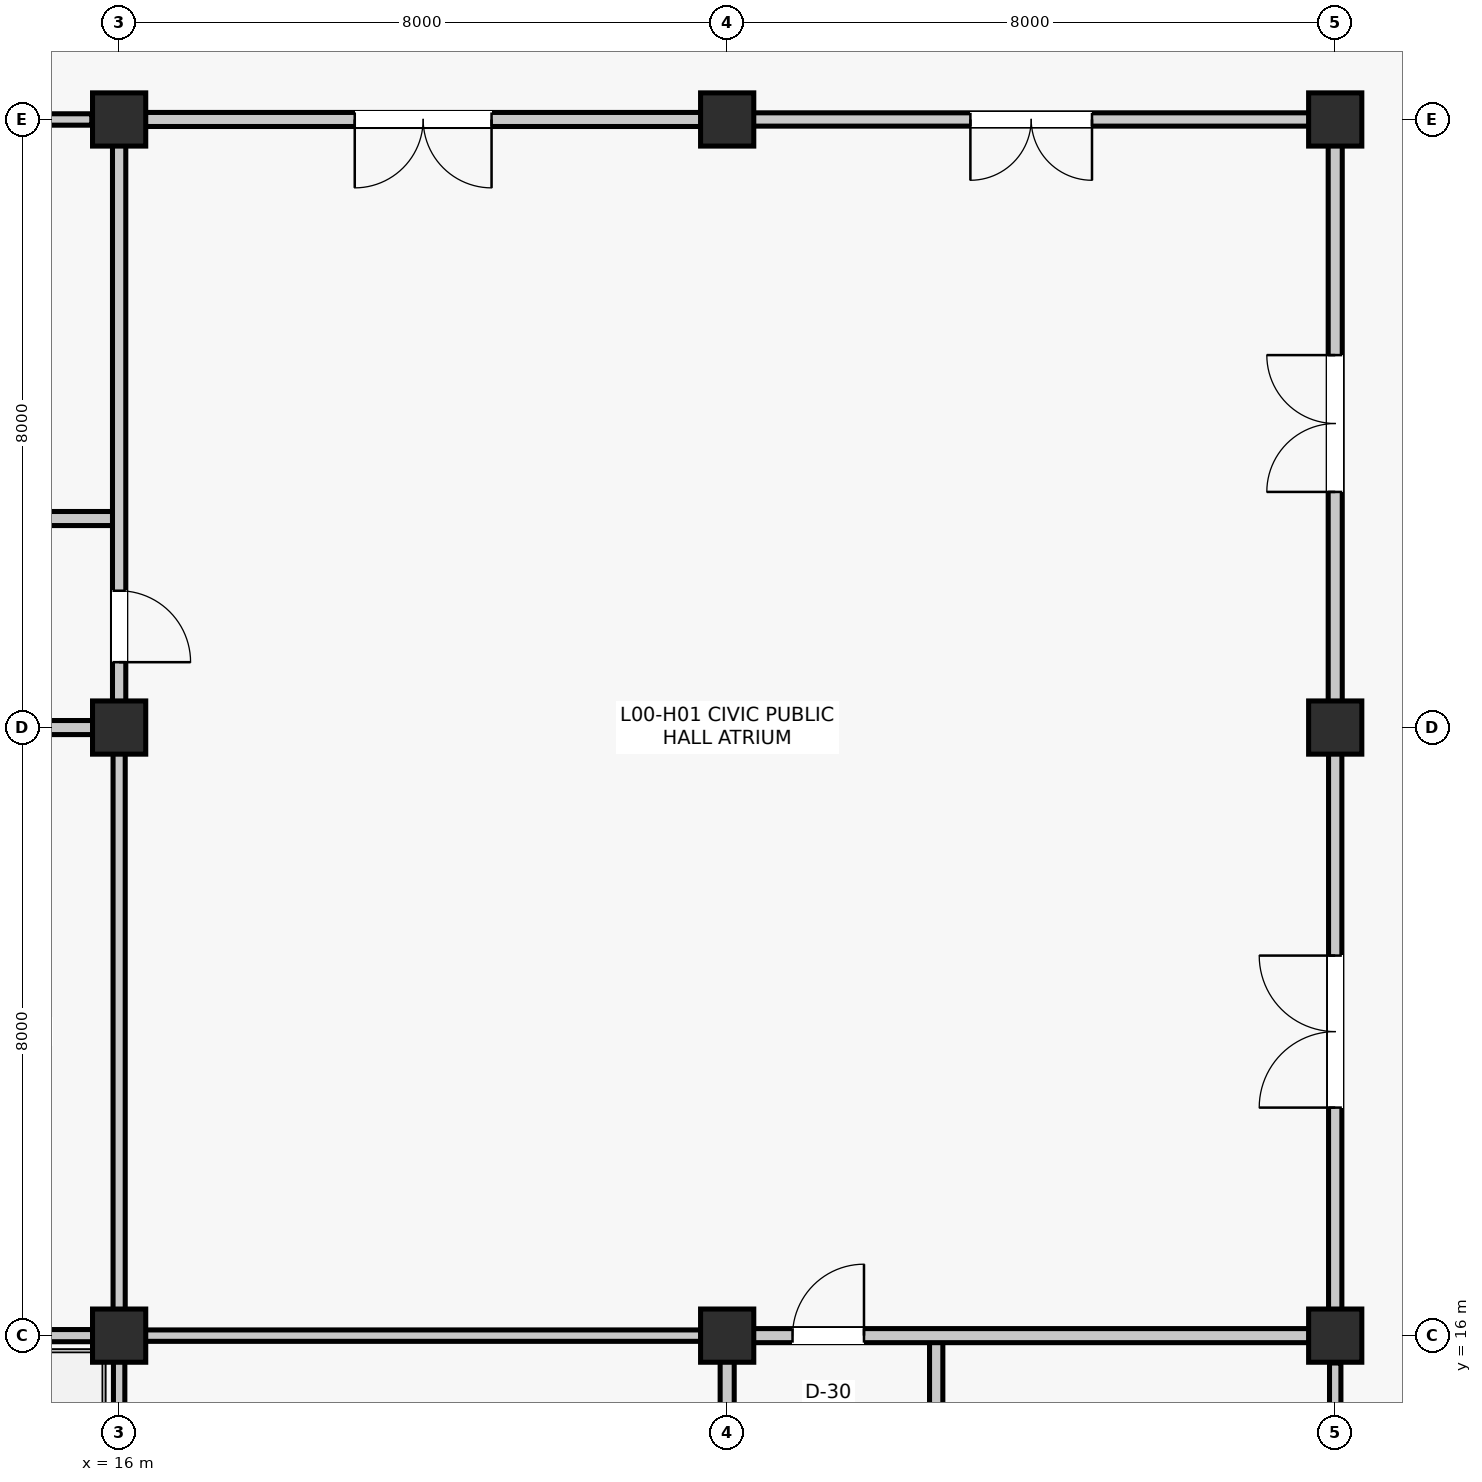
"""IFC4 building model, lengths in metres.
Left out: names, types, materials, properties, quantities, classifications, styles, units other than length and angle.
Written with IfcOpenShell. Run it as: python <this file> out.ifc"""

import sys

from ifc_helpers import new_model, si_unit, direction, frame, frame_2d, origin, origin_2d, place, context, subcontext, project, spatial, rectangle, extrude, element, fill, save


model = new_model("IFC4")
c1 = context("Model", 3, precision=1e-05, world=origin(), true_north=direction((0.0, 1.0)))
c2 = subcontext(c1, "Body", "Model", "MODEL_VIEW")
j1 = project(units=[si_unit("LENGTHUNIT", "METRE"), si_unit("PLANEANGLEUNIT", "RADIAN")], contexts=[c1])
p1 = place(None, origin())
s1 = spatial("IfcSite", under=j1, at=p1, CompositionType="ELEMENT")
p2 = place(p1, origin())
s2 = spatial("IfcBuilding", under=s1, at=p2, CompositionType="ELEMENT")
p3 = place(p2, origin())
s3 = spatial("IfcBuildingStorey", under=s2, at=p3, CompositionType="ELEMENT", Elevation=0.0)
for number, where, z_axis, x_axis in (
    (1, (16.0, 16.0, 0.0), (0.0, 0.0, 1.0), (1.0, 0.0, 0.0)),
    (2, (16.0, 24.0, 0.0), (0.0, 0.0, 1.0), (1.0, 0.0, 0.0)),
    (3, (16.0, 32.0, 0.0), (0.0, 0.0, 1.0), (1.0, 0.0, 0.0)),
    (4, (24.0, 16.0, 0.0), (0.0, 0.0, 1.0), (1.0, 0.0, 0.0)),
    (5, (24.0, 32.0, 0.0), (0.0, 0.0, 1.0), (1.0, 0.0, 0.0)),
    (6, (32.0, 16.0, 0.0), (0.0, 0.0, 1.0), (1.0, 0.0, 0.0)),
    (7, (32.0, 24.0, 0.0), (0.0, 0.0, 1.0), (1.0, 0.0, 0.0)),
    (8, (32.0, 32.0, 0.0), (0.0, 0.0, 1.0), (1.0, 0.0, 0.0)),
):
    element("IfcColumn", number, at=place(p3, frame(where, z_axis=z_axis, x_axis=x_axis)), inside=s3, PredefinedType="COLUMN", context=c2, shape_type="SweptSolid", body=[
        extrude(rectangle(XDim=0.7, YDim=0.7, at=origin_2d()), origin(), (0.0, 0.0, 1.0), 5.28),
    ])
p4 = place(p3, frame((10.7, 26.75, 0.0), z_axis=(0.0, 0.0, 1.0), x_axis=(1.0, 0.0, 0.0)))
e9 = element("IfcWall", 9, at=p4, inside=s3, PredefinedType="PARTITIONING", context=c2, shape_type="SweptSolid", body=[
    extrude(rectangle(XDim=5.28, YDim=0.185, at=frame_2d((2.64, 0.0))), origin(), (0.0, 0.0, 1.0), 4.667),
])
p5 = place(p4, frame((2.12, 0.0, 0.0)))
e10 = element("IfcOpeningElement", 10, at=p5, cuts=e9, PredefinedType="OPENING", context=c2, shape_type="SweptSolid", body=[
    extrude(rectangle(XDim=1.04, YDim=2.18, at=frame_2d((0.52, 1.09))), frame((0.0, 0.103, 0.0), z_axis=(0.0, -1.0, 0.0), x_axis=(1.0, 0.0, 0.0)), (0.0, 0.0, 1.0), 0.205),
])
p6 = place(p3, frame((10.75, 32.0, 0.0), z_axis=(0.0, 0.0, 1.0), x_axis=(1.0, 0.0, 0.0)))
e11 = element("IfcWall", 11, at=p6, inside=s3, PredefinedType="PARTITIONING", context=c2, shape_type="SweptSolid", body=[
    extrude(rectangle(XDim=4.89, YDim=0.15, at=frame_2d((2.445, 0.0))), origin(), (0.0, 0.0, 1.0), 4.403),
])
p7 = place(p3, frame((26.75, 10.7, 0.0), z_axis=(0.0, 0.0, 1.0), x_axis=(0.0, 1.0, 0.0)))
e12 = element("IfcWall", 12, at=p7, inside=s3, PredefinedType="PARTITIONING", context=c2, shape_type="SweptSolid", body=[
    extrude(rectangle(XDim=5.28, YDim=0.175, at=frame_2d((2.64, 0.0))), origin(), (0.0, 0.0, 1.0), 4.667),
])
p8 = place(p3, frame((32.0, 10.75, 0.0), z_axis=(0.0, 0.0, 1.0), x_axis=(0.0, 1.0, 0.0)))
e13 = element("IfcWall", 13, at=p8, inside=s3, PredefinedType="PARTITIONING", context=c2, shape_type="SweptSolid", body=[
    extrude(rectangle(XDim=4.89, YDim=0.15, at=frame_2d((2.445, 0.0))), origin(), (0.0, 0.0, 1.0), 4.412),
])
p9 = place(p3, frame((16.0, 8.34, 0.0), z_axis=(0.0, 0.0, 1.0), x_axis=(0.0, 1.0, 0.0)))
e14 = element("IfcWall", 14, at=p9, inside=s3, PredefinedType="PARTITIONING", context=c2, shape_type="SweptSolid", body=[
    extrude(rectangle(XDim=7.32, YDim=0.15, at=frame_2d((3.66, 0.0))), origin(), (0.0, 0.0, 1.0), 4.471),
])
p10 = place(p3, frame((8.39, 16.0, 0.0), z_axis=(0.0, 0.0, 1.0), x_axis=(1.0, 0.0, 0.0)))
e15 = element("IfcWall", 15, at=p10, inside=s3, PredefinedType="PARTITIONING", context=c2, shape_type="SweptSolid", body=[
    extrude(rectangle(XDim=7.27, YDim=0.16, at=frame_2d((3.635, 0.0))), origin(), (0.0, 0.0, 1.0), 4.404),
])
p11 = place(p3, frame((16.0, 16.34, 0.0), z_axis=(0.0, 0.0, 1.0), x_axis=(0.0, 1.0, 0.0)))
e16 = element("IfcWall", 16, at=p11, inside=s3, PredefinedType="PARTITIONING", context=c2, shape_type="SweptSolid", body=[
    extrude(rectangle(XDim=7.32, YDim=0.16, at=frame_2d((3.66, 0.0))), origin(), (0.0, 0.0, 1.0), 4.603),
])
p12 = place(p3, frame((8.39, 24.0, 0.0), z_axis=(0.0, 0.0, 1.0), x_axis=(1.0, 0.0, 0.0)))
e17 = element("IfcWall", 17, at=p12, inside=s3, PredefinedType="PARTITIONING", context=c2, shape_type="SweptSolid", body=[
    extrude(rectangle(XDim=7.27, YDim=0.185, at=frame_2d((3.635, 0.0))), origin(), (0.0, 0.0, 1.0), 4.327),
])
p13 = place(p12, frame((1.343, 0.0, 0.0)))
e18 = element("IfcOpeningElement", 18, at=p13, cuts=e17, PredefinedType="OPENING", context=c2, shape_type="SweptSolid", body=[
    extrude(rectangle(XDim=0.95, YDim=2.1, at=frame_2d((0.475, 1.05))), frame((0.0, 0.103, 0.0), z_axis=(0.0, -1.0, 0.0), x_axis=(1.0, 0.0, 0.0)), (0.0, 0.0, 1.0), 0.205),
])
p14 = place(p12, frame((5.341, 0.0, 0.0)))
e19 = element("IfcOpeningElement", 19, at=p14, cuts=e17, PredefinedType="OPENING", context=c2, shape_type="SweptSolid", body=[
    extrude(rectangle(XDim=0.95, YDim=2.1, at=frame_2d((0.475, 1.05))), frame((0.0, 0.103, 0.0), z_axis=(0.0, -1.0, 0.0), x_axis=(1.0, 0.0, 0.0)), (0.0, 0.0, 1.0), 0.205),
])
p15 = place(p3, frame((16.0, 24.34, 0.0), z_axis=(0.0, 0.0, 1.0), x_axis=(0.0, 1.0, 0.0)))
e20 = element("IfcWall", 20, at=p15, inside=s3, PredefinedType="PARTITIONING", context=c2, shape_type="SweptSolid", body=[
    extrude(rectangle(XDim=7.32, YDim=0.175, at=frame_2d((3.66, 0.0))), origin(), (0.0, 0.0, 1.0), 4.667),
])
p16 = place(p15, frame((0.52, 0.0, 0.0)))
e21 = element("IfcOpeningElement", 21, at=p16, cuts=e20, PredefinedType="OPENING", context=c2, shape_type="SweptSolid", body=[
    extrude(rectangle(XDim=0.94, YDim=2.12, at=frame_2d((0.47, 1.06))), frame((0.0, 0.097, 0.0), z_axis=(0.0, -1.0, 0.0), x_axis=(1.0, 0.0, 0.0)), (0.0, 0.0, 1.0), 0.195),
])
p17 = place(p3, frame((24.0, 8.34, 0.0), z_axis=(0.0, 0.0, 1.0), x_axis=(0.0, 1.0, 0.0)))
e22 = element("IfcWall", 22, at=p17, inside=s3, PredefinedType="PARTITIONING", context=c2, shape_type="SweptSolid", body=[
    extrude(rectangle(XDim=7.32, YDim=0.185, at=frame_2d((3.66, 0.0))), origin(), (0.0, 0.0, 1.0), 4.403),
])
p18 = place(p17, frame((3.1, 0.0, 0.0)))
e23 = element("IfcOpeningElement", 23, at=p18, cuts=e22, PredefinedType="OPENING", context=c2, shape_type="SweptSolid", body=[
    extrude(rectangle(XDim=1.12, YDim=2.22, at=frame_2d((0.56, 1.11))), frame((0.0, 0.103, 0.0), z_axis=(0.0, -1.0, 0.0), x_axis=(1.0, 0.0, 0.0)), (0.0, 0.0, 1.0), 0.205),
])
p19 = place(p3, frame((16.34, 16.0, 0.0), z_axis=(0.0, 0.0, 1.0), x_axis=(1.0, 0.0, 0.0)))
e24 = element("IfcWall", 24, at=p19, inside=s3, PredefinedType="PARTITIONING", context=c2, shape_type="SweptSolid", body=[
    extrude(rectangle(XDim=7.32, YDim=0.15, at=frame_2d((3.66, 0.0))), origin(), (0.0, 0.0, 1.0), 4.603),
])
p20 = place(p3, frame((16.34, 32.0, 0.0), z_axis=(0.0, 0.0, 1.0), x_axis=(1.0, 0.0, 0.0)))
e25 = element("IfcWall", 25, at=p20, inside=s3, PredefinedType="PARTITIONING", context=c2, shape_type="SweptSolid", body=[
    extrude(rectangle(XDim=7.32, YDim=0.185, at=frame_2d((3.66, 0.0))), origin(), (0.0, 0.0, 1.0), 4.607),
])
p21 = place(p20, frame((2.76, 0.0, 0.0)))
e26 = element("IfcOpeningElement", 26, at=p21, cuts=e25, PredefinedType="OPENING", context=c2, shape_type="SweptSolid", body=[
    extrude(rectangle(XDim=1.8, YDim=2.35, at=frame_2d((0.9, 1.175))), frame((0.0, 0.103, 0.0), z_axis=(0.0, -1.0, 0.0), x_axis=(1.0, 0.0, 0.0)), (0.0, 0.0, 1.0), 0.205),
])
p22 = place(p3, frame((24.34, 16.0, 0.0), z_axis=(0.0, 0.0, 1.0), x_axis=(1.0, 0.0, 0.0)))
e27 = element("IfcWall", 27, at=p22, inside=s3, PredefinedType="PARTITIONING", context=c2, shape_type="SweptSolid", body=[
    extrude(rectangle(XDim=7.32, YDim=0.185, at=frame_2d((3.66, 0.0))), origin(), (0.0, 0.0, 1.0), 4.667),
])
p23 = place(p22, frame((0.52, 0.0, 0.0)))
e28 = element("IfcOpeningElement", 28, at=p23, cuts=e27, PredefinedType="OPENING", context=c2, shape_type="SweptSolid", body=[
    extrude(rectangle(XDim=0.94, YDim=2.12, at=frame_2d((0.47, 1.06))), frame((0.0, 0.103, 0.0), z_axis=(0.0, -1.0, 0.0), x_axis=(1.0, 0.0, 0.0)), (0.0, 0.0, 1.0), 0.205),
])
p24 = place(p3, frame((32.0, 16.34, 0.0), z_axis=(0.0, 0.0, 1.0), x_axis=(0.0, 1.0, 0.0)))
e29 = element("IfcWall", 29, at=p24, inside=s3, PredefinedType="PARTITIONING", context=c2, shape_type="SweptSolid", body=[
    extrude(rectangle(XDim=7.32, YDim=0.175, at=frame_2d((3.66, 0.0))), origin(), (0.0, 0.0, 1.0), 4.607),
])
p25 = place(p24, frame((2.66, 0.0, 0.0)))
e30 = element("IfcOpeningElement", 30, at=p25, cuts=e29, PredefinedType="OPENING", context=c2, shape_type="SweptSolid", body=[
    extrude(rectangle(XDim=2.0, YDim=2.4, at=frame_2d((1.0, 1.2))), frame((0.0, 0.097, 0.0), z_axis=(0.0, -1.0, 0.0), x_axis=(1.0, 0.0, 0.0)), (0.0, 0.0, 1.0), 0.195),
])
p26 = place(p3, frame((32.0, 24.34, 0.0), z_axis=(0.0, 0.0, 1.0), x_axis=(0.0, 1.0, 0.0)))
e31 = element("IfcWall", 31, at=p26, inside=s3, PredefinedType="PARTITIONING", context=c2, shape_type="SweptSolid", body=[
    extrude(rectangle(XDim=7.32, YDim=0.185, at=frame_2d((3.66, 0.0))), origin(), (0.0, 0.0, 1.0), 4.67),
])
p27 = place(p26, frame((2.76, 0.0, 0.0)))
e32 = element("IfcOpeningElement", 32, at=p27, cuts=e31, PredefinedType="OPENING", context=c2, shape_type="SweptSolid", body=[
    extrude(rectangle(XDim=1.8, YDim=2.35, at=frame_2d((0.9, 1.175))), frame((0.0, 0.103, 0.0), z_axis=(0.0, -1.0, 0.0), x_axis=(1.0, 0.0, 0.0)), (0.0, 0.0, 1.0), 0.205),
])
p28 = place(p3, frame((24.34, 32.0, 0.0), z_axis=(0.0, 0.0, 1.0), x_axis=(1.0, 0.0, 0.0)))
e33 = element("IfcWall", 33, at=p28, inside=s3, PredefinedType="PARTITIONING", context=c2, shape_type="SweptSolid", body=[
    extrude(rectangle(XDim=7.32, YDim=0.175, at=frame_2d((3.66, 0.0))), origin(), (0.0, 0.0, 1.0), 4.67),
])
p29 = place(p28, frame((2.86, 0.0, 0.0)))
e34 = element("IfcOpeningElement", 34, at=p29, cuts=e33, PredefinedType="OPENING", context=c2, shape_type="SweptSolid", body=[
    extrude(rectangle(XDim=1.6, YDim=2.25, at=frame_2d((0.8, 1.125))), frame((0.0, 0.097, 0.0), z_axis=(0.0, -1.0, 0.0), x_axis=(1.0, 0.0, 0.0)), (0.0, 0.0, 1.0), 0.195),
])
p30 = place(p16, frame((0.94, 0.0, 0.0), z_axis=(0.0, 0.0, 1.0), x_axis=(-1.0, 0.0, 0.0)))
e35 = element("IfcDoor", 35, at=p30, inside=s3, OperationType="SINGLE_SWING_LEFT", PredefinedType="DOOR", context=c2, shape_type="SweptSolid", body=[
    extrude(rectangle(XDim=0.94, YDim=2.12, at=frame_2d((0.47, 1.06))), frame((0.0, 0.025, 0.0), z_axis=(0.0, -1.0, 0.0), x_axis=(1.0, 0.0, 0.0)), (0.0, 0.0, 1.0), 0.05),
])
fill(e21, e35)
p31 = place(p21, frame((1.8, 0.0, 0.0), z_axis=(0.0, 0.0, 1.0), x_axis=(-1.0, 0.0, 0.0)))
e36 = element("IfcDoor", 36, at=p31, inside=s3, OperationType="DOUBLE_DOOR_SINGLE_SWING", PredefinedType="DOOR", context=c2, shape_type="SweptSolid", body=[
    extrude(rectangle(XDim=1.8, YDim=2.35, at=frame_2d((0.9, 1.175))), frame((0.0, 0.025, 0.0), z_axis=(0.0, -1.0, 0.0), x_axis=(1.0, 0.0, 0.0)), (0.0, 0.0, 1.0), 0.05),
])
fill(e26, e36)
p32 = place(p23, origin())
e37 = element("IfcDoor", 37, at=p32, inside=s3, OperationType="SINGLE_SWING_RIGHT", PredefinedType="DOOR", context=c2, shape_type="SweptSolid", body=[
    extrude(rectangle(XDim=0.94, YDim=2.12, at=frame_2d((0.47, 1.06))), frame((0.0, 0.025, 0.0), z_axis=(0.0, -1.0, 0.0), x_axis=(1.0, 0.0, 0.0)), (0.0, 0.0, 1.0), 0.05),
])
fill(e28, e37)
p33 = place(p25, origin())
e38 = element("IfcDoor", 38, at=p33, inside=s3, OperationType="DOUBLE_DOOR_SINGLE_SWING", PredefinedType="DOOR", context=c2, shape_type="SweptSolid", body=[
    extrude(rectangle(XDim=2.0, YDim=2.4, at=frame_2d((1.0, 1.2))), frame((0.0, 0.025, 0.0), z_axis=(0.0, -1.0, 0.0), x_axis=(1.0, 0.0, 0.0)), (0.0, 0.0, 1.0), 0.05),
])
fill(e30, e38)
p34 = place(p27, origin())
e39 = element("IfcDoor", 39, at=p34, inside=s3, OperationType="DOUBLE_DOOR_SINGLE_SWING", PredefinedType="DOOR", context=c2, shape_type="SweptSolid", body=[
    extrude(rectangle(XDim=1.8, YDim=2.35, at=frame_2d((0.9, 1.175))), frame((0.0, 0.025, 0.0), z_axis=(0.0, -1.0, 0.0), x_axis=(1.0, 0.0, 0.0)), (0.0, 0.0, 1.0), 0.05),
])
fill(e32, e39)
p35 = place(p29, frame((1.6, 0.0, 0.0), z_axis=(0.0, 0.0, 1.0), x_axis=(-1.0, 0.0, 0.0)))
e40 = element("IfcDoor", 40, at=p35, inside=s3, OperationType="DOUBLE_DOOR_SINGLE_SWING", PredefinedType="DOOR", context=c2, shape_type="SweptSolid", body=[
    extrude(rectangle(XDim=1.6, YDim=2.25, at=frame_2d((0.8, 1.125))), frame((0.0, 0.025, 0.0), z_axis=(0.0, -1.0, 0.0), x_axis=(1.0, 0.0, 0.0)), (0.0, 0.0, 1.0), 0.05),
])
fill(e34, e40)
save(model, sys.argv[1])
